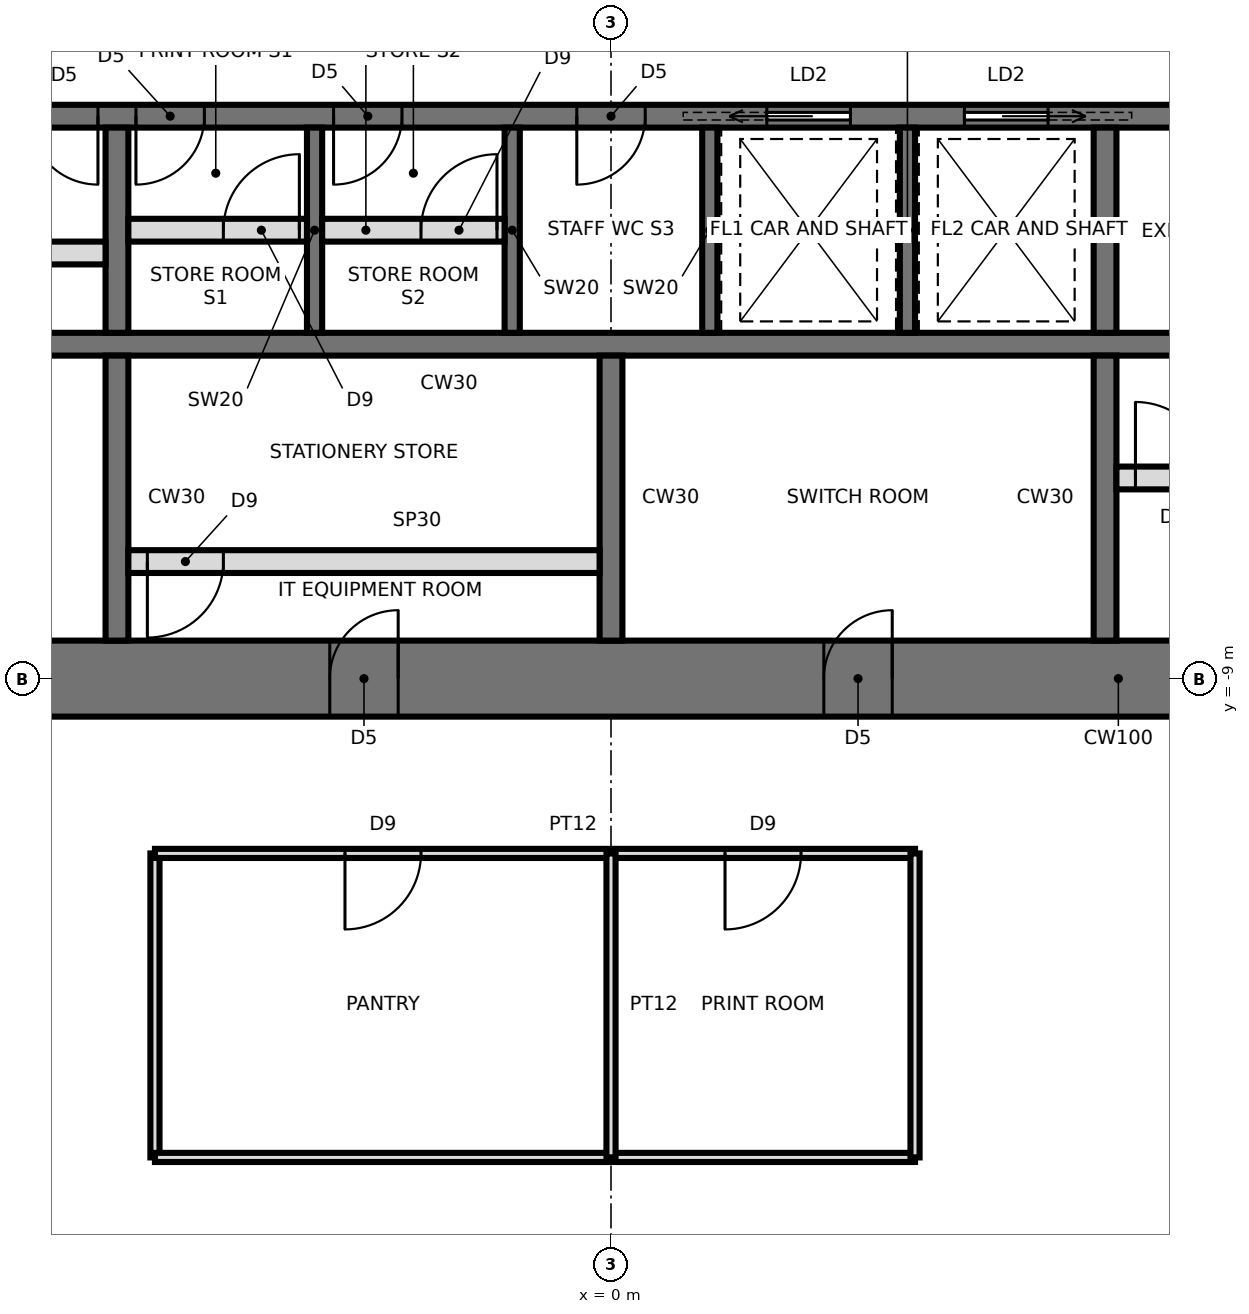
"""IFC4 building model, lengths in metres.
Left out: names, types, materials, properties, quantities, classifications, styles, units other than length and angle.
Written with IfcOpenShell. Run it as: python <this file> out.ifc"""

import sys

from ifc_helpers import new_model, si_unit, direction, frame, frame_2d, origin, place, context, subcontext, project, spatial, rectangle, extrude, element, fill, save


model = new_model("IFC4")
c1 = context("Model", 3, precision=1e-05, world=origin(), true_north=direction((0.0, 1.0)))
c2 = subcontext(c1, "Body", "Model", "MODEL_VIEW")
j1 = project(units=[si_unit("LENGTHUNIT", "METRE"), si_unit("PLANEANGLEUNIT", "RADIAN")], contexts=[c1])
p1 = place(None, origin())
s1 = spatial("IfcSite", under=j1, at=p1, CompositionType="ELEMENT")
p2 = place(p1, origin())
s2 = spatial("IfcBuilding", under=s1, at=p2, CompositionType="ELEMENT")
p3 = place(p2, frame((0.0, 0.0, 268.6)))
s3 = spatial("IfcBuildingStorey", under=s2, at=p3, CompositionType="ELEMENT", Elevation=268.6)
p4 = place(p3, frame((-13.2, -9.0, 0.0), z_axis=(0.0, 0.0, 1.0), x_axis=(1.0, 0.0, 0.0)))
e1 = element("IfcWall", 1, at=p4, inside=s3, PredefinedType="SHEAR", context=c2, shape_type="SweptSolid", body=[
    extrude(rectangle(XDim=26.4, YDim=1.0, at=frame_2d((13.2, 0.0))), origin(), (0.0, 0.0, 1.0), 4.2),
])
p5 = place(p4, frame((2.65, 0.0, 0.0)))
e2 = element("IfcOpeningElement", 2, at=p5, cuts=e1, PredefinedType="OPENING", context=c2, shape_type="SweptSolid", body=[
    extrude(rectangle(XDim=0.9, YDim=2.1, at=frame_2d((0.45, 1.05))), frame((0.0, 0.51, 0.0), z_axis=(0.0, -1.0, 0.0), x_axis=(1.0, 0.0, 0.0)), (0.0, 0.0, 1.0), 1.02),
])
p6 = place(p4, frame((9.5, 0.0, 0.0)))
e3 = element("IfcOpeningElement", 3, at=p6, cuts=e1, PredefinedType="OPENING", context=c2, shape_type="SweptSolid", body=[
    extrude(rectangle(XDim=0.9, YDim=2.1, at=frame_2d((0.45, 1.05))), frame((0.0, 0.51, 0.0), z_axis=(0.0, -1.0, 0.0), x_axis=(1.0, 0.0, 0.0)), (0.0, 0.0, 1.0), 1.02),
])
p7 = place(p4, frame((16.0, 0.0, 0.0)))
e4 = element("IfcOpeningElement", 4, at=p7, cuts=e1, PredefinedType="OPENING", context=c2, shape_type="SweptSolid", body=[
    extrude(rectangle(XDim=0.9, YDim=2.1, at=frame_2d((0.45, 1.05))), frame((0.0, 0.51, 0.0), z_axis=(0.0, -1.0, 0.0), x_axis=(1.0, 0.0, 0.0)), (0.0, 0.0, 1.0), 1.02),
])
p8 = place(p4, frame((22.85, 0.0, 0.0)))
e5 = element("IfcOpeningElement", 5, at=p8, cuts=e1, PredefinedType="OPENING", context=c2, shape_type="SweptSolid", body=[
    extrude(rectangle(XDim=0.9, YDim=2.1, at=frame_2d((0.45, 1.05))), frame((0.0, 0.51, 0.0), z_axis=(0.0, -1.0, 0.0), x_axis=(1.0, 0.0, 0.0)), (0.0, 0.0, 1.0), 1.02),
])
p9 = place(p3, frame((-13.2, -1.6, 0.0), z_axis=(0.0, 0.0, 1.0), x_axis=(1.0, 0.0, 0.0)))
e6 = element("IfcWall", 6, at=p9, inside=s3, PredefinedType="SHEAR", context=c2, shape_type="SweptSolid", body=[
    extrude(rectangle(XDim=26.4, YDim=0.3, at=frame_2d((13.2, 0.0))), origin(), (0.0, 0.0, 1.0), 4.2),
])
p10 = place(p9, frame((25.15, 0.0, 0.0)))
e7 = element("IfcOpeningElement", 7, at=p10, cuts=e6, PredefinedType="OPENING", context=c2, shape_type="SweptSolid", body=[
    extrude(rectangle(XDim=1.0, YDim=2.1, at=frame_2d((0.5, 1.05))), frame((0.0, 0.16, 0.0), z_axis=(0.0, -1.0, 0.0), x_axis=(1.0, 0.0, 0.0)), (0.0, 0.0, 1.0), 0.32),
])
p11 = place(p9, frame((6.95, 0.0, 0.0)))
e8 = element("IfcOpeningElement", 8, at=p11, cuts=e6, PredefinedType="OPENING", context=c2, shape_type="SweptSolid", body=[
    extrude(rectangle(XDim=0.9, YDim=2.1, at=frame_2d((0.45, 1.05))), frame((0.0, 0.16, 0.0), z_axis=(0.0, -1.0, 0.0), x_axis=(1.0, 0.0, 0.0)), (0.0, 0.0, 1.0), 0.32),
])
p12 = place(p9, frame((9.55, 0.0, 0.0)))
e9 = element("IfcOpeningElement", 9, at=p12, cuts=e6, PredefinedType="OPENING", context=c2, shape_type="SweptSolid", body=[
    extrude(rectangle(XDim=0.9, YDim=2.1, at=frame_2d((0.45, 1.05))), frame((0.0, 0.16, 0.0), z_axis=(0.0, -1.0, 0.0), x_axis=(1.0, 0.0, 0.0)), (0.0, 0.0, 1.0), 0.32),
])
p13 = place(p9, frame((12.75, 0.0, 0.0)))
e10 = element("IfcOpeningElement", 10, at=p13, cuts=e6, PredefinedType="OPENING", context=c2, shape_type="SweptSolid", body=[
    extrude(rectangle(XDim=0.9, YDim=2.1, at=frame_2d((0.45, 1.05))), frame((0.0, 0.16, 0.0), z_axis=(0.0, -1.0, 0.0), x_axis=(1.0, 0.0, 0.0)), (0.0, 0.0, 1.0), 0.32),
])
p14 = place(p9, frame((15.25, 0.0, 0.0)))
e11 = element("IfcOpeningElement", 11, at=p14, cuts=e6, PredefinedType="OPENING", context=c2, shape_type="SweptSolid", body=[
    extrude(rectangle(XDim=1.1, YDim=2.3, at=frame_2d((0.55, 1.15))), frame((0.0, 0.16, 0.0), z_axis=(0.0, -1.0, 0.0), x_axis=(1.0, 0.0, 0.0)), (0.0, 0.0, 1.0), 0.32),
])
p15 = place(p9, frame((17.85, 0.0, 0.0)))
e12 = element("IfcOpeningElement", 12, at=p15, cuts=e6, PredefinedType="OPENING", context=c2, shape_type="SweptSolid", body=[
    extrude(rectangle(XDim=1.1, YDim=2.3, at=frame_2d((0.55, 1.15))), frame((0.0, 0.16, 0.0), z_axis=(0.0, -1.0, 0.0), x_axis=(1.0, 0.0, 0.0)), (0.0, 0.0, 1.0), 0.32),
])
p16 = place(p9, frame((5.55, 0.0, 0.0)))
e13 = element("IfcOpeningElement", 13, at=p16, cuts=e6, PredefinedType="OPENING", context=c2, shape_type="SweptSolid", body=[
    extrude(rectangle(XDim=0.9, YDim=2.1, at=frame_2d((0.45, 1.05))), frame((0.0, 0.16, 0.0), z_axis=(0.0, -1.0, 0.0), x_axis=(1.0, 0.0, 0.0)), (0.0, 0.0, 1.0), 0.32),
])
p17 = place(p3, frame((-13.2, -4.6, 0.0), z_axis=(0.0, 0.0, 1.0), x_axis=(1.0, 0.0, 0.0)))
e14 = element("IfcWall", 14, at=p17, inside=s3, PredefinedType="SHEAR", context=c2, shape_type="SweptSolid", body=[
    extrude(rectangle(XDim=26.4, YDim=0.3, at=frame_2d((13.2, 0.0))), origin(), (0.0, 0.0, 1.0), 4.2),
])
p18 = place(p3, frame((-6.5, -1.75, 0.0), z_axis=(0.0, 0.0, 1.0), x_axis=(0.0, -1.0, 0.0)))
e15 = element("IfcWall", 15, at=p18, inside=s3, PredefinedType="SHEAR", context=c2, shape_type="SweptSolid", body=[
    extrude(rectangle(XDim=2.7, YDim=0.3, at=frame_2d((1.35, 0.0))), origin(), (0.0, 0.0, 1.0), 4.2),
])
p19 = place(p3, frame((-6.5, -4.75, 0.0), z_axis=(0.0, 0.0, 1.0), x_axis=(0.0, -1.0, 0.0)))
e16 = element("IfcWall", 16, at=p19, inside=s3, PredefinedType="SHEAR", context=c2, shape_type="SweptSolid", body=[
    extrude(rectangle(XDim=3.75, YDim=0.3, at=frame_2d((1.875, 0.0))), origin(), (0.0, 0.0, 1.0), 4.2),
])
p20 = place(p3, frame((6.5, -1.75, 0.0), z_axis=(0.0, 0.0, 1.0), x_axis=(0.0, -1.0, 0.0)))
e17 = element("IfcWall", 17, at=p20, inside=s3, PredefinedType="SHEAR", context=c2, shape_type="SweptSolid", body=[
    extrude(rectangle(XDim=2.7, YDim=0.3, at=frame_2d((1.35, 0.0))), origin(), (0.0, 0.0, 1.0), 4.2),
])
p21 = place(p3, frame((6.5, -4.75, 0.0), z_axis=(0.0, 0.0, 1.0), x_axis=(0.0, -1.0, 0.0)))
e18 = element("IfcWall", 18, at=p21, inside=s3, PredefinedType="SHEAR", context=c2, shape_type="SweptSolid", body=[
    extrude(rectangle(XDim=3.75, YDim=0.3, at=frame_2d((1.875, 0.0))), origin(), (0.0, 0.0, 1.0), 4.2),
])
for number, where, z_axis, x_axis in (
    (19, (-3.9, -1.75, 0.0), (0.0, 0.0, 1.0), (0.0, -1.0, 0.0)),
    (20, (-1.3, -1.75, 0.0), (0.0, 0.0, 1.0), (0.0, -1.0, 0.0)),
    (21, (1.3, -1.75, 0.0), (0.0, 0.0, 1.0), (0.0, -1.0, 0.0)),
    (22, (3.9, -1.75, 0.0), (0.0, 0.0, 1.0), (0.0, -1.0, 0.0)),
):
    element("IfcWall", number, at=place(p3, frame(where, z_axis=z_axis, x_axis=x_axis)), inside=s3, PredefinedType="SHEAR", context=c2, shape_type="SweptSolid", body=[
        extrude(rectangle(XDim=2.7, YDim=0.2, at=frame_2d((1.35, 0.0))), origin(), (0.0, 0.0, 1.0), 4.2),
    ])
p22 = place(p3, frame((0.0, -4.75, 0.0), z_axis=(0.0, 0.0, 1.0), x_axis=(0.0, -1.0, 0.0)))
e23 = element("IfcWall", 23, at=p22, inside=s3, PredefinedType="SHEAR", context=c2, shape_type="SweptSolid", body=[
    extrude(rectangle(XDim=3.75, YDim=0.3, at=frame_2d((1.875, 0.0))), origin(), (0.0, 0.0, 1.0), 4.2),
])
p23 = place(p3, frame((-6.35, -3.1, 0.0), z_axis=(0.0, 0.0, 1.0), x_axis=(1.0, 0.0, 0.0)))
e24 = element("IfcWall", 24, at=p23, inside=s3, PredefinedType="PARTITIONING", context=c2, shape_type="SweptSolid", body=[
    extrude(rectangle(XDim=2.35, YDim=0.3, at=frame_2d((1.175, 0.0))), origin(), (0.0, 0.0, 1.0), 4.04),
])
p24 = place(p23, frame((1.25, 0.0, 0.0)))
e25 = element("IfcOpeningElement", 25, at=p24, cuts=e24, PredefinedType="OPENING", context=c2, shape_type="SweptSolid", body=[
    extrude(rectangle(XDim=1.0, YDim=2.4, at=frame_2d((0.5, 1.2))), frame((0.0, 0.16, 0.0), z_axis=(0.0, -1.0, 0.0), x_axis=(1.0, 0.0, 0.0)), (0.0, 0.0, 1.0), 0.32),
])
p25 = place(p3, frame((-3.8, -3.1, 0.0), z_axis=(0.0, 0.0, 1.0), x_axis=(1.0, 0.0, 0.0)))
e26 = element("IfcWall", 26, at=p25, inside=s3, PredefinedType="PARTITIONING", context=c2, shape_type="SweptSolid", body=[
    extrude(rectangle(XDim=2.4, YDim=0.3, at=frame_2d((1.2, 0.0))), origin(), (0.0, 0.0, 1.0), 4.04),
])
p26 = place(p25, frame((1.3, 0.0, 0.0)))
e27 = element("IfcOpeningElement", 27, at=p26, cuts=e26, PredefinedType="OPENING", context=c2, shape_type="SweptSolid", body=[
    extrude(rectangle(XDim=1.0, YDim=2.4, at=frame_2d((0.5, 1.2))), frame((0.0, 0.16, 0.0), z_axis=(0.0, -1.0, 0.0), x_axis=(1.0, 0.0, 0.0)), (0.0, 0.0, 1.0), 0.32),
])
p27 = place(p3, frame((-6.35, -7.46, 0.0), z_axis=(0.0, 0.0, 1.0), x_axis=(1.0, 0.0, 0.0)))
e28 = element("IfcWall", 28, at=p27, inside=s3, PredefinedType="PARTITIONING", context=c2, shape_type="SweptSolid", body=[
    extrude(rectangle(XDim=6.2, YDim=0.3, at=frame_2d((3.1, 0.0))), origin(), (0.0, 0.0, 1.0), 4.04),
])
p28 = place(p27, frame((0.25, 0.0, 0.0)))
e29 = element("IfcOpeningElement", 29, at=p28, cuts=e28, PredefinedType="OPENING", context=c2, shape_type="SweptSolid", body=[
    extrude(rectangle(XDim=1.0, YDim=2.4, at=frame_2d((0.5, 1.2))), frame((0.0, 0.16, 0.0), z_axis=(0.0, -1.0, 0.0), x_axis=(1.0, 0.0, 0.0)), (0.0, 0.0, 1.0), 0.32),
])
p29 = place(p3, frame((6.65, -6.36, 0.0), z_axis=(0.0, 0.0, 1.0), x_axis=(1.0, 0.0, 0.0)))
e30 = element("IfcWall", 30, at=p29, inside=s3, PredefinedType="PARTITIONING", context=c2, shape_type="SweptSolid", body=[
    extrude(rectangle(XDim=6.55, YDim=0.3, at=frame_2d((3.275, 0.0))), origin(), (0.0, 0.0, 1.0), 4.04),
])
p30 = place(p29, frame((0.25, 0.0, 0.0)))
e31 = element("IfcOpeningElement", 31, at=p30, cuts=e30, PredefinedType="OPENING", context=c2, shape_type="SweptSolid", body=[
    extrude(rectangle(XDim=1.0, YDim=2.4, at=frame_2d((0.5, 1.2))), frame((0.0, 0.16, 0.0), z_axis=(0.0, -1.0, 0.0), x_axis=(1.0, 0.0, 0.0)), (0.0, 0.0, 1.0), 0.32),
])
p31 = place(p3, frame((-13.2, -3.4, 0.0), z_axis=(0.0, 0.0, 1.0), x_axis=(1.0, 0.0, 0.0)))
e32 = element("IfcWall", 32, at=p31, inside=s3, PredefinedType="SOLIDWALL", context=c2, shape_type="SweptSolid", body=[
    extrude(rectangle(XDim=6.55, YDim=0.3, at=frame_2d((3.275, 0.0))), origin(), (0.0, 0.0, 1.0), 4.04),
])
p32 = place(p31, frame((0.25, 0.0, 0.0)))
e33 = element("IfcOpeningElement", 33, at=p32, cuts=e32, PredefinedType="OPENING", context=c2, shape_type="SweptSolid", body=[
    extrude(rectangle(XDim=0.9, YDim=2.1, at=frame_2d((0.45, 1.05))), frame((0.0, 0.16, 0.0), z_axis=(0.0, -1.0, 0.0), x_axis=(1.0, 0.0, 0.0)), (0.0, 0.0, 1.0), 0.32),
])
p33 = place(p3, frame((-6.0, -15.3, 0.0), z_axis=(0.0, 0.0, 1.0), x_axis=(0.0, 1.0, 0.0)))
e34 = element("IfcWall", 34, at=p33, inside=s3, PredefinedType="PARTITIONING", context=c2, shape_type="SweptSolid", body=[
    extrude(rectangle(XDim=4.0, YDim=0.12, at=frame_2d((2.0, 0.0))), origin(), (0.0, 0.0, 1.0), 4.04),
])
p34 = place(p3, frame((-6.0, -11.3, 0.0), z_axis=(0.0, 0.0, 1.0), x_axis=(1.0, 0.0, 0.0)))
e35 = element("IfcWall", 35, at=p34, inside=s3, PredefinedType="PARTITIONING", context=c2, shape_type="SweptSolid", body=[
    extrude(rectangle(XDim=10.0, YDim=0.12, at=frame_2d((5.0, 0.0))), origin(), (0.0, 0.0, 1.0), 4.04),
])
p35 = place(p34, frame((2.5, 0.0, 0.0)))
e36 = element("IfcOpeningElement", 36, at=p35, cuts=e35, PredefinedType="OPENING", context=c2, shape_type="SweptSolid", body=[
    extrude(rectangle(XDim=1.0, YDim=2.4, at=frame_2d((0.5, 1.2))), frame((0.0, 0.07, 0.0), z_axis=(0.0, -1.0, 0.0), x_axis=(1.0, 0.0, 0.0)), (0.0, 0.0, 1.0), 0.14),
])
p36 = place(p34, frame((7.5, 0.0, 0.0)))
e37 = element("IfcOpeningElement", 37, at=p36, cuts=e35, PredefinedType="OPENING", context=c2, shape_type="SweptSolid", body=[
    extrude(rectangle(XDim=1.0, YDim=2.4, at=frame_2d((0.5, 1.2))), frame((0.0, 0.07, 0.0), z_axis=(0.0, -1.0, 0.0), x_axis=(1.0, 0.0, 0.0)), (0.0, 0.0, 1.0), 0.14),
])
p37 = place(p3, frame((4.0, -15.3, 0.0), z_axis=(0.0, 0.0, 1.0), x_axis=(-1.0, 0.0, 0.0)))
e38 = element("IfcWall", 38, at=p37, inside=s3, PredefinedType="PARTITIONING", context=c2, shape_type="SweptSolid", body=[
    extrude(rectangle(XDim=10.0, YDim=0.12, at=frame_2d((5.0, 0.0))), origin(), (0.0, 0.0, 1.0), 3.637),
])
p38 = place(p3, frame((0.0, -11.3, 0.0), z_axis=(0.0, 0.0, 1.0), x_axis=(0.0, -1.0, 0.0)))
e39 = element("IfcWall", 39, at=p38, inside=s3, PredefinedType="PARTITIONING", context=c2, shape_type="SweptSolid", body=[
    extrude(rectangle(XDim=4.0, YDim=0.12, at=frame_2d((2.0, 0.0))), origin(), (0.0, 0.0, 1.0), 3.24),
])
p39 = place(p3, frame((4.0, -11.3, 0.0), z_axis=(0.0, 0.0, 1.0), x_axis=(0.0, -1.0, 0.0)))
e40 = element("IfcWall", 40, at=p39, inside=s3, PredefinedType="PARTITIONING", context=c2, shape_type="SweptSolid", body=[
    extrude(rectangle(XDim=4.0, YDim=0.12, at=frame_2d((2.0, 0.0))), origin(), (0.0, 0.0, 1.0), 4.04),
])
p40 = place(p24, origin())
e41 = element("IfcDoor", 41, at=p40, inside=s3, OperationType="SINGLE_SWING_RIGHT", PredefinedType="DOOR", context=c2, shape_type="SweptSolid", body=[
    extrude(rectangle(XDim=1.0, YDim=2.4, at=frame_2d((0.5, 1.2))), frame((0.0, 0.025, 0.0), z_axis=(0.0, -1.0, 0.0), x_axis=(1.0, 0.0, 0.0)), (0.0, 0.0, 1.0), 0.05),
])
fill(e25, e41)
p41 = place(p11, frame((0.9, 0.0, 0.0), z_axis=(0.0, 0.0, 1.0), x_axis=(-1.0, 0.0, 0.0)))
e42 = element("IfcDoor", 42, at=p41, inside=s3, OperationType="SINGLE_SWING_RIGHT", PredefinedType="DOOR", context=c2, shape_type="SweptSolid", body=[
    extrude(rectangle(XDim=0.9, YDim=2.1, at=frame_2d((0.45, 1.05))), frame((0.0, 0.025, 0.0), z_axis=(0.0, -1.0, 0.0), x_axis=(1.0, 0.0, 0.0)), (0.0, 0.0, 1.0), 0.05),
])
fill(e8, e42)
p42 = place(p26, origin())
e43 = element("IfcDoor", 43, at=p42, inside=s3, OperationType="SINGLE_SWING_RIGHT", PredefinedType="DOOR", context=c2, shape_type="SweptSolid", body=[
    extrude(rectangle(XDim=1.0, YDim=2.4, at=frame_2d((0.5, 1.2))), frame((0.0, 0.025, 0.0), z_axis=(0.0, -1.0, 0.0), x_axis=(1.0, 0.0, 0.0)), (0.0, 0.0, 1.0), 0.05),
])
fill(e27, e43)
p43 = place(p12, frame((0.9, 0.0, 0.0), z_axis=(0.0, 0.0, 1.0), x_axis=(-1.0, 0.0, 0.0)))
e44 = element("IfcDoor", 44, at=p43, inside=s3, OperationType="SINGLE_SWING_RIGHT", PredefinedType="DOOR", context=c2, shape_type="SweptSolid", body=[
    extrude(rectangle(XDim=0.9, YDim=2.1, at=frame_2d((0.45, 1.05))), frame((0.0, 0.025, 0.0), z_axis=(0.0, -1.0, 0.0), x_axis=(1.0, 0.0, 0.0)), (0.0, 0.0, 1.0), 0.05),
])
fill(e9, e44)
p44 = place(p13, frame((0.9, 0.0, 0.0), z_axis=(0.0, 0.0, 1.0), x_axis=(-1.0, 0.0, 0.0)))
e45 = element("IfcDoor", 45, at=p44, inside=s3, OperationType="SINGLE_SWING_RIGHT", PredefinedType="DOOR", context=c2, shape_type="SweptSolid", body=[
    extrude(rectangle(XDim=0.9, YDim=2.1, at=frame_2d((0.45, 1.05))), frame((0.0, 0.025, 0.0), z_axis=(0.0, -1.0, 0.0), x_axis=(1.0, 0.0, 0.0)), (0.0, 0.0, 1.0), 0.05),
])
fill(e10, e45)
p45 = place(p14, frame((1.1, 0.0, 0.0), z_axis=(0.0, 0.0, 1.0), x_axis=(-1.0, 0.0, 0.0)))
e46 = element("IfcDoor", 46, at=p45, inside=s3, OperationType="SLIDING_TO_RIGHT", PredefinedType="DOOR", context=c2, shape_type="SweptSolid", body=[
    extrude(rectangle(XDim=1.1, YDim=2.3, at=frame_2d((0.55, 1.15))), frame((0.0, 0.025, 0.0), z_axis=(0.0, -1.0, 0.0), x_axis=(1.0, 0.0, 0.0)), (0.0, 0.0, 1.0), 0.05),
])
fill(e11, e46)
p46 = place(p15, frame((1.1, 0.0, 0.0), z_axis=(0.0, 0.0, 1.0), x_axis=(-1.0, 0.0, 0.0)))
e47 = element("IfcDoor", 47, at=p46, inside=s3, OperationType="SLIDING_TO_LEFT", PredefinedType="DOOR", context=c2, shape_type="SweptSolid", body=[
    extrude(rectangle(XDim=1.1, YDim=2.3, at=frame_2d((0.55, 1.15))), frame((0.0, 0.025, 0.0), z_axis=(0.0, -1.0, 0.0), x_axis=(1.0, 0.0, 0.0)), (0.0, 0.0, 1.0), 0.05),
])
fill(e12, e47)
p47 = place(p16, frame((0.9, 0.0, 0.0), z_axis=(0.0, 0.0, 1.0), x_axis=(-1.0, 0.0, 0.0)))
e48 = element("IfcDoor", 48, at=p47, inside=s3, OperationType="SINGLE_SWING_LEFT", PredefinedType="DOOR", context=c2, shape_type="SweptSolid", body=[
    extrude(rectangle(XDim=0.9, YDim=2.1, at=frame_2d((0.45, 1.05))), frame((0.0, 0.025, 0.0), z_axis=(0.0, -1.0, 0.0), x_axis=(1.0, 0.0, 0.0)), (0.0, 0.0, 1.0), 0.05),
])
fill(e13, e48)
p48 = place(p6, origin())
e49 = element("IfcDoor", 49, at=p48, inside=s3, OperationType="SINGLE_SWING_RIGHT", PredefinedType="DOOR", context=c2, shape_type="SweptSolid", body=[
    extrude(rectangle(XDim=0.82, YDim=2.06, at=frame_2d((0.45, 1.03))), frame((0.0, 0.025, 0.0), z_axis=(0.0, -1.0, 0.0), x_axis=(1.0, 0.0, 0.0)), (0.0, 0.0, 1.0), 0.05),
    extrude(rectangle(XDim=0.04, YDim=2.1, at=frame_2d((0.02, 1.05))), frame((0.0, 0.25, 0.0), z_axis=(0.0, -1.0, 0.0), x_axis=(1.0, 0.0, 0.0)), (0.0, 0.0, 1.0), 0.5),
    extrude(rectangle(XDim=0.04, YDim=2.1, at=frame_2d((0.88, 1.05))), frame((0.0, 0.25, 0.0), z_axis=(0.0, -1.0, 0.0), x_axis=(1.0, 0.0, 0.0)), (0.0, 0.0, 1.0), 0.5),
    extrude(rectangle(XDim=0.82, YDim=0.04, at=frame_2d((0.45, 2.08))), frame((0.0, 0.25, 0.0), z_axis=(0.0, -1.0, 0.0), x_axis=(1.0, 0.0, 0.0)), (0.0, 0.0, 1.0), 0.5),
])
fill(e3, e49)
p49 = place(p7, origin())
e50 = element("IfcDoor", 50, at=p49, inside=s3, OperationType="SINGLE_SWING_RIGHT", PredefinedType="DOOR", context=c2, shape_type="SweptSolid", body=[
    extrude(rectangle(XDim=0.82, YDim=2.06, at=frame_2d((0.45, 1.03))), frame((0.0, 0.025, 0.0), z_axis=(0.0, -1.0, 0.0), x_axis=(1.0, 0.0, 0.0)), (0.0, 0.0, 1.0), 0.05),
    extrude(rectangle(XDim=0.04, YDim=2.1, at=frame_2d((0.02, 1.05))), frame((0.0, 0.25, 0.0), z_axis=(0.0, -1.0, 0.0), x_axis=(1.0, 0.0, 0.0)), (0.0, 0.0, 1.0), 0.5),
    extrude(rectangle(XDim=0.04, YDim=2.1, at=frame_2d((0.88, 1.05))), frame((0.0, 0.25, 0.0), z_axis=(0.0, -1.0, 0.0), x_axis=(1.0, 0.0, 0.0)), (0.0, 0.0, 1.0), 0.5),
    extrude(rectangle(XDim=0.82, YDim=0.04, at=frame_2d((0.45, 2.08))), frame((0.0, 0.25, 0.0), z_axis=(0.0, -1.0, 0.0), x_axis=(1.0, 0.0, 0.0)), (0.0, 0.0, 1.0), 0.5),
])
fill(e4, e50)
p50 = place(p28, frame((1.0, 0.0, 0.0), z_axis=(0.0, 0.0, 1.0), x_axis=(-1.0, 0.0, 0.0)))
e51 = element("IfcDoor", 51, at=p50, inside=s3, OperationType="SINGLE_SWING_RIGHT", PredefinedType="DOOR", context=c2, shape_type="SweptSolid", body=[
    extrude(rectangle(XDim=1.0, YDim=2.4, at=frame_2d((0.5, 1.2))), frame((0.0, 0.025, 0.0), z_axis=(0.0, -1.0, 0.0), x_axis=(1.0, 0.0, 0.0)), (0.0, 0.0, 1.0), 0.05),
])
fill(e29, e51)
p51 = place(p30, origin())
e52 = element("IfcDoor", 52, at=p51, inside=s3, OperationType="SINGLE_SWING_LEFT", PredefinedType="DOOR", context=c2, shape_type="SweptSolid", body=[
    extrude(rectangle(XDim=1.0, YDim=2.4, at=frame_2d((0.5, 1.2))), frame((0.0, 0.025, 0.0), z_axis=(0.0, -1.0, 0.0), x_axis=(1.0, 0.0, 0.0)), (0.0, 0.0, 1.0), 0.05),
])
fill(e31, e52)
p52 = place(p35, frame((1.0, 0.0, 0.0), z_axis=(0.0, 0.0, 1.0), x_axis=(-1.0, 0.0, 0.0)))
e53 = element("IfcDoor", 53, at=p52, inside=s3, OperationType="SINGLE_SWING_RIGHT", PredefinedType="DOOR", context=c2, shape_type="SweptSolid", body=[
    extrude(rectangle(XDim=1.0, YDim=2.4, at=frame_2d((0.5, 1.2))), frame((0.0, 0.025, 0.0), z_axis=(0.0, -1.0, 0.0), x_axis=(1.0, 0.0, 0.0)), (0.0, 0.0, 1.0), 0.05),
])
fill(e36, e53)
p53 = place(p36, frame((1.0, 0.0, 0.0), z_axis=(0.0, 0.0, 1.0), x_axis=(-1.0, 0.0, 0.0)))
e54 = element("IfcDoor", 54, at=p53, inside=s3, OperationType="SINGLE_SWING_RIGHT", PredefinedType="DOOR", context=c2, shape_type="SweptSolid", body=[
    extrude(rectangle(XDim=1.0, YDim=2.4, at=frame_2d((0.5, 1.2))), frame((0.0, 0.025, 0.0), z_axis=(0.0, -1.0, 0.0), x_axis=(1.0, 0.0, 0.0)), (0.0, 0.0, 1.0), 0.05),
])
fill(e37, e54)
save(model, sys.argv[1])
